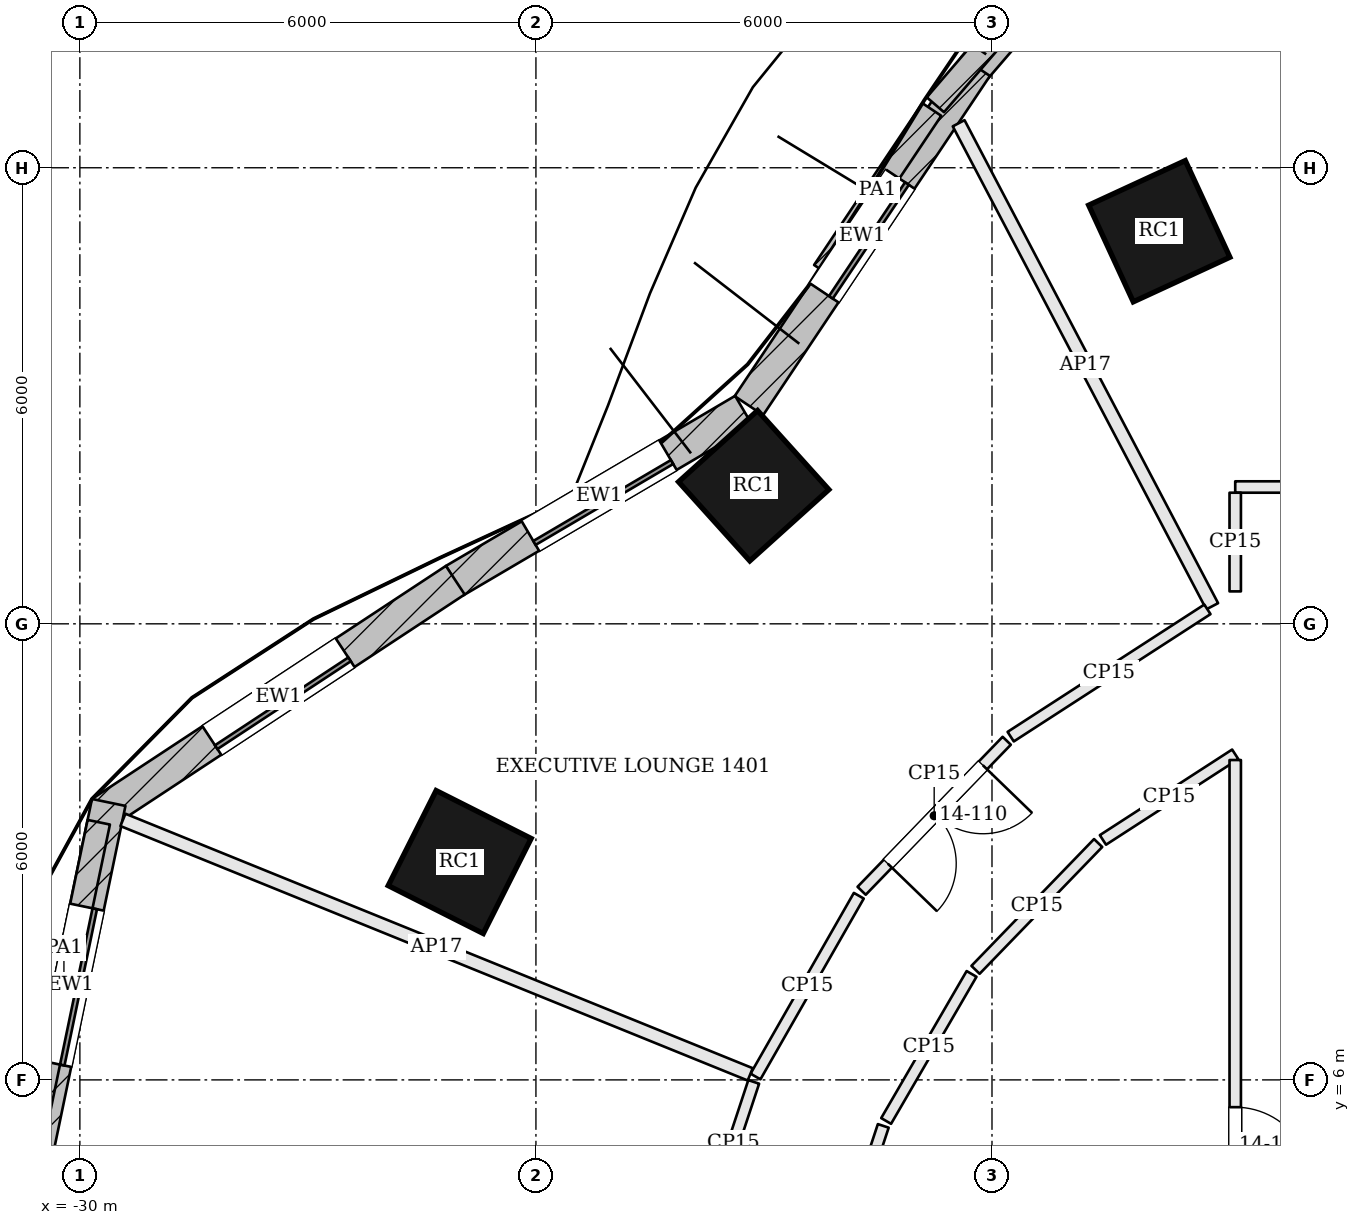
"""IFC4 building model, lengths in metres.
Left out: names, types, materials, properties, quantities, classifications, styles, units other than length and angle.
Written with IfcOpenShell. Run it as: python <this file> out.ifc"""

import sys

from ifc_helpers import new_model, si_unit, direction, frame, frame_2d, origin, origin_2d, place, context, subcontext, project, spatial, rectangle, extrude, element, fill, save


model = new_model("IFC4")
c1 = context("Model", 3, precision=1e-05, world=origin(), true_north=direction((0.0, 1.0)))
c2 = subcontext(c1, "Body", "Model", "MODEL_VIEW")
j1 = project(units=[si_unit("LENGTHUNIT", "METRE"), si_unit("PLANEANGLEUNIT", "RADIAN")], contexts=[c1])
p1 = place(None, origin())
s1 = spatial("IfcSite", under=j1, at=p1, CompositionType="ELEMENT")
p2 = place(p1, origin())
s2 = spatial("IfcBuilding", under=s1, at=p2, CompositionType="ELEMENT")
p3 = place(p2, frame((0.0, 0.0, 66.3)))
s3 = spatial("IfcBuildingStorey", under=s2, at=p3, CompositionType="ELEMENT", Elevation=66.3)
for number, where, z_axis, x_axis in (
    (1, (-15.799, 17.165, 0.0), (0.0, 0.0, 1.0), (-0.908, -0.419, 0.0)),
    (2, (-21.135, 13.817, 0.0), (0.0, 0.0, 1.0), (-0.743, -0.67, 0.0)),
    (3, (-25.003, 8.866, 0.0), (0.0, 0.0, 1.0), (-0.45, -0.893, 0.0)),
):
    element("IfcColumn", number, at=place(p3, frame(where, z_axis=z_axis, x_axis=x_axis)), inside=s3, PredefinedType="COLUMN", context=c2, shape_type="SweptSolid", body=[
        extrude(rectangle(XDim=1.4, YDim=1.4, at=origin_2d()), origin(), (0.0, 0.0, 1.0), 3.6),
    ])
p4 = place(p3, frame((-15.919, 21.999, 0.0), z_axis=(0.0, 0.0, 1.0), x_axis=(-0.652009971272, -0.758210391225, 0.0)))
e4 = element("IfcWall", 4, at=p4, inside=s3, PredefinedType="SOLIDWALL", context=c2, shape_type="SweptSolid", body=[
    extrude(rectangle(XDim=3.545, YDim=0.45, at=frame_2d((1.772, 0.0))), origin(), (0.0, 0.0, 1.0), 3.4),
])
p5 = place(p4, frame((0.722, 0.0, 0.9)))
e5 = element("IfcOpeningElement", 5, at=p5, cuts=e4, PredefinedType="OPENING", context=c2, shape_type="SweptSolid", body=[
    extrude(rectangle(XDim=2.1, YDim=2.0, at=frame_2d((1.05, 1.0))), frame((0.0, 0.235, 0.0), z_axis=(0.0, -1.0, 0.0), x_axis=(1.0, 0.0, 0.0)), (0.0, 0.0, 1.0), 0.47),
])
p6 = place(p3, frame((-18.214, 19.333, 0.0), z_axis=(0.0, 0.0, 1.0), x_axis=(-0.555833135316, -0.831293886471, 0.0)))
e6 = element("IfcWall", 6, at=p6, inside=s3, PredefinedType="SOLIDWALL", context=c2, shape_type="SweptSolid", body=[
    extrude(rectangle(XDim=5.368, YDim=0.45, at=frame_2d((2.684, 0.0))), origin(), (0.0, 0.0, 1.0), 3.4),
])
p7 = place(p6, frame((1.784, 0.0, 0.9)))
e7 = element("IfcOpeningElement", 7, at=p7, cuts=e6, PredefinedType="OPENING", context=c2, shape_type="SweptSolid", body=[
    extrude(rectangle(XDim=1.8, YDim=2.0, at=frame_2d((0.9, 1.0))), frame((0.0, 0.235, 0.0), z_axis=(0.0, -1.0, 0.0), x_axis=(1.0, 0.0, 0.0)), (0.0, 0.0, 1.0), 0.47),
])
p8 = place(p3, frame((-21.266, 14.805, 0.0), z_axis=(0.0, 0.0, 1.0), x_axis=(-0.861975457737, -0.506950007653, 0.0)))
e8 = element("IfcWall", 8, at=p8, inside=s3, PredefinedType="SOLIDWALL", context=c2, shape_type="SweptSolid", body=[
    extrude(rectangle(XDim=4.413, YDim=0.45, at=frame_2d((2.207, 0.0))), origin(), (0.0, 0.0, 1.0), 3.4),
])
p9 = place(p8, frame((1.156, 0.0, 0.9)))
e9 = element("IfcOpeningElement", 9, at=p9, cuts=e8, PredefinedType="OPENING", context=c2, shape_type="SweptSolid", body=[
    extrude(rectangle(XDim=2.1, YDim=2.0, at=frame_2d((1.05, 1.0))), frame((0.0, 0.235, 0.0), z_axis=(0.0, -1.0, 0.0), x_axis=(1.0, 0.0, 0.0)), (0.0, 0.0, 1.0), 0.47),
])
p10 = place(p3, frame((-25.061, 12.574, 0.0), z_axis=(0.0, 0.0, 1.0), x_axis=(-0.83520622102, -0.549936876714, 0.0)))
e10 = element("IfcWall", 10, at=p10, inside=s3, PredefinedType="SOLIDWALL", context=c2, shape_type="SweptSolid", body=[
    extrude(rectangle(XDim=5.57, YDim=0.45, at=frame_2d((2.785, 0.0))), origin(), (0.0, 0.0, 1.0), 3.4),
])
p11 = place(p10, frame((1.735, 0.0, 0.9)))
e11 = element("IfcOpeningElement", 11, at=p11, cuts=e10, PredefinedType="OPENING", context=c2, shape_type="SweptSolid", body=[
    extrude(rectangle(XDim=2.1, YDim=2.0, at=frame_2d((1.05, 1.0))), frame((0.0, 0.235, 0.0), z_axis=(0.0, -1.0, 0.0), x_axis=(1.0, 0.0, 0.0)), (0.0, 0.0, 1.0), 0.47),
])
p12 = place(p3, frame((-29.621, 9.65, 0.0), z_axis=(0.0, 0.0, 1.0), x_axis=(-0.203505836306, -0.979073732969, 0.0)))
e12 = element("IfcWall", 12, at=p12, inside=s3, PredefinedType="SOLIDWALL", context=c2, shape_type="SweptSolid", body=[
    extrude(rectangle(XDim=4.914, YDim=0.45, at=frame_2d((2.457, 0.0))), origin(), (0.0, 0.0, 1.0), 3.4),
])
p13 = place(p12, frame((1.407, 0.0, 0.9)))
e13 = element("IfcOpeningElement", 13, at=p13, cuts=e12, PredefinedType="OPENING", context=c2, shape_type="SweptSolid", body=[
    extrude(rectangle(XDim=2.1, YDim=2.0, at=frame_2d((1.05, 1.0))), frame((0.0, 0.235, 0.0), z_axis=(0.0, -1.0, 0.0), x_axis=(1.0, 0.0, 0.0)), (0.0, 0.0, 1.0), 0.47),
])
p14 = place(p3, frame((-18.076, 19.492, 0.0), z_axis=(0.0, 0.0, 1.0), x_axis=(-0.822618823872, 0.568593238274, 0.0)))
e14 = element("IfcWall", 14, at=p14, inside=s3, PredefinedType="SOLIDWALL", context=c2, shape_type="SweptSolid", body=[
    extrude(rectangle(XDim=1.75, YDim=0.2, at=frame_2d((0.875, 0.0))), origin(), (0.0, 0.0, 1.0), 3.4),
])
p15 = place(p3, frame((-16.056, 21.956, 3.6), z_axis=(0.0, 0.0, 1.0), x_axis=(-0.652038588201, -0.75818578165, 0.0)))
e15 = element("IfcWall", 15, at=p15, inside=s3, PredefinedType="PARAPET", context=c2, shape_type="SweptSolid", body=[
    extrude(rectangle(XDim=4.124, YDim=0.3, at=frame_2d((2.062, 0.0))), origin(), (0.0, 0.0, 1.0), 1.1),
])
p16 = place(p3, frame((-18.792, 18.767, 3.6), z_axis=(0.0, 0.0, 1.0), x_axis=(-0.555843382853, -0.831287034507, 0.0)))
e16 = element("IfcWall", 16, at=p16, inside=s3, PredefinedType="PARAPET", context=c2, shape_type="SweptSolid", body=[
    extrude(rectangle(XDim=2.562, YDim=0.3, at=frame_2d((1.281, 0.0))), origin(), (0.0, 0.0, 1.0), 1.1),
])
p17 = place(p3, frame((-29.751, 9.39, 3.6), z_axis=(0.0, 0.0, 1.0), x_axis=(-0.203510555438, -0.97907275206, 0.0)))
e17 = element("IfcWall", 17, at=p17, inside=s3, PredefinedType="PARAPET", context=c2, shape_type="SweptSolid", body=[
    extrude(rectangle(XDim=4.505, YDim=0.3, at=frame_2d((2.252, 0.0))), origin(), (0.0, 0.0, 1.0), 1.1),
])
p18 = place(p3, frame((-11.464, 13.8, 0.0), z_axis=(0.0, 0.0, 1.0), x_axis=(-1.0, 0.0, 0.0)))
e18 = element("IfcWall", 18, at=p18, inside=s3, PredefinedType="PARTITIONING", context=c2, shape_type="SweptSolid", body=[
    extrude(rectangle(XDim=3.336, YDim=0.15, at=frame_2d((1.668, 0.0))), origin(), (0.0, 0.0, 1.0), 2.68),
])
p19 = place(p3, frame((-14.8, 13.725, 0.0), z_axis=(0.0, 0.0, 1.0), x_axis=(-0.000188040613, -0.99999998232, 0.0)))
e19 = element("IfcWall", 19, at=p19, inside=s3, PredefinedType="PARTITIONING", context=c2, shape_type="SweptSolid", body=[
    extrude(rectangle(XDim=1.298, YDim=0.15, at=frame_2d((0.649, 0.0))), origin(), (0.0, 0.0, 1.0), 2.68),
])
p20 = place(p3, frame((-18.439, 18.586, 0.0), z_axis=(0.0, 0.0, 1.0), x_axis=(0.464815231758, -0.885407702884, 0.0)))
e20 = element("IfcWall", 20, at=p20, inside=s3, PredefinedType="PARTITIONING", context=c2, shape_type="SweptSolid", body=[
    extrude(rectangle(XDim=7.177, YDim=0.175, at=frame_2d((3.588, 0.0))), origin(), (0.0, 0.0, 1.0), 2.68),
])
p21 = place(p3, frame((-15.166, 12.19, 0.0), z_axis=(0.0, 0.0, 1.0), x_axis=(-0.839538287855, -0.54330052754, 0.0)))
e21 = element("IfcWall", 21, at=p21, inside=s3, PredefinedType="PARTITIONING", context=c2, shape_type="SweptSolid", body=[
    extrude(rectangle(XDim=3.083, YDim=0.15, at=frame_2d((1.542, 0.0))), origin(), (0.0, 0.0, 1.0), 2.68),
])
p22 = place(p3, frame((-17.806, 10.462, 0.0), z_axis=(0.0, 0.0, 1.0), x_axis=(-0.695227375123, -0.71878988368, 0.0)))
e22 = element("IfcWall", 22, at=p22, inside=s3, PredefinedType="PARTITIONING", context=c2, shape_type="SweptSolid", body=[
    extrude(rectangle(XDim=2.746, YDim=0.15, at=frame_2d((1.373, 0.0))), origin(), (0.0, 0.0, 1.0), 2.68),
])
p23 = place(p22, frame((0.45, 0.0, 0.0)))
e23 = element("IfcOpeningElement", 23, at=p23, cuts=e22, PredefinedType="OPENING", context=c2, shape_type="SweptSolid", body=[
    extrude(rectangle(XDim=1.8, YDim=2.1, at=frame_2d((0.9, 1.05))), frame((0.0, 0.085, 0.0), z_axis=(0.0, -1.0, 0.0), x_axis=(1.0, 0.0, 0.0)), (0.0, 0.0, 1.0), 0.17),
])
p24 = place(p3, frame((-19.752, 8.423, 0.0), z_axis=(0.0, 0.0, 1.0), x_axis=(-0.496186930697, -0.86821571617, 0.0)))
e24 = element("IfcWall", 24, at=p24, inside=s3, PredefinedType="PARTITIONING", context=c2, shape_type="SweptSolid", body=[
    extrude(rectangle(XDim=2.739, YDim=0.15, at=frame_2d((1.37, 0.0))), origin(), (0.0, 0.0, 1.0), 2.68),
])
p25 = place(p3, frame((-29.434, 9.421, 0.0), z_axis=(0.0, 0.0, 1.0), x_axis=(0.92666211568, -0.375895362252, 0.0)))
e25 = element("IfcWall", 25, at=p25, inside=s3, PredefinedType="PARTITIONING", context=c2, shape_type="SweptSolid", body=[
    extrude(rectangle(XDim=8.906, YDim=0.175, at=frame_2d((4.453, 0.0))), origin(), (0.0, 0.0, 1.0), 2.68),
])
p26 = place(p3, frame((-21.135, 5.973, 0.0), z_axis=(0.0, 0.0, 1.0), x_axis=(-0.313641633586, -0.949541429155, 0.0)))
e26 = element("IfcWall", 26, at=p26, inside=s3, PredefinedType="PARTITIONING", context=c2, shape_type="SweptSolid", body=[
    extrude(rectangle(XDim=1.7, YDim=0.15, at=frame_2d((0.85, 0.0))), origin(), (0.0, 0.0, 1.0), 2.68),
])
p27 = place(p3, frame((-19.882, 4.028, 0.0), z_axis=(0.0, 0.0, 1.0), x_axis=(0.313632756375, 0.949544361327, 0.0)))
e27 = element("IfcWall", 27, at=p27, inside=s3, PredefinedType="PARTITIONING", context=c2, shape_type="SweptSolid", body=[
    extrude(rectangle(XDim=1.44, YDim=0.15, at=frame_2d((0.72, 0.0))), origin(), (0.0, 0.0, 1.0), 2.68),
])
p28 = place(p3, frame((-19.393, 5.46, 0.0), z_axis=(0.0, 0.0, 1.0), x_axis=(0.502296094562, 0.864695688314, 0.0)))
e28 = element("IfcWall", 28, at=p28, inside=s3, PredefinedType="PARTITIONING", context=c2, shape_type="SweptSolid", body=[
    extrude(rectangle(XDim=2.237, YDim=0.15, at=frame_2d((1.119, 0.0))), origin(), (0.0, 0.0, 1.0), 2.68),
])
p29 = place(p3, frame((-18.217, 7.448, 0.0), z_axis=(0.0, 0.0, 1.0), x_axis=(0.695172542355, 0.718842914938, 0.0)))
e29 = element("IfcWall", 29, at=p29, inside=s3, PredefinedType="PARTITIONING", context=c2, shape_type="SweptSolid", body=[
    extrude(rectangle(XDim=2.321, YDim=0.15, at=frame_2d((1.16, 0.0))), origin(), (0.0, 0.0, 1.0), 2.68),
])
p30 = place(p3, frame((-16.54, 9.157, 0.0), z_axis=(0.0, 0.0, 1.0), x_axis=(0.839529075717, 0.543314762385, 0.0)))
e30 = element("IfcWall", 30, at=p30, inside=s3, PredefinedType="PARTITIONING", context=c2, shape_type="SweptSolid", body=[
    extrude(rectangle(XDim=2.073, YDim=0.15, at=frame_2d((1.036, 0.0))), origin(), (0.0, 0.0, 1.0), 2.68),
])
p31 = place(p3, frame((-14.8, 10.208, 0.0), z_axis=(0.0, 0.0, 1.0), x_axis=(0.0, -1.0, 0.0)))
e31 = element("IfcWall", 31, at=p31, inside=s3, PredefinedType="PARTITIONING", context=c2, shape_type="SweptSolid", body=[
    extrude(rectangle(XDim=15.008, YDim=0.15, at=frame_2d((7.504, 0.0))), origin(), (0.0, 0.0, 1.0), 2.68),
])
p32 = place(p31, frame((4.567, 0.0, 0.0)))
e32 = element("IfcOpeningElement", 32, at=p32, cuts=e31, PredefinedType="OPENING", context=c2, shape_type="SweptSolid", body=[
    extrude(rectangle(XDim=1.0, YDim=2.1, at=frame_2d((0.5, 1.05))), frame((0.0, 0.085, 0.0), z_axis=(0.0, -1.0, 0.0), x_axis=(1.0, 0.0, 0.0)), (0.0, 0.0, 1.0), 0.17),
])
p33 = place(p7, origin())
e33 = element("IfcWindow", 33, at=p33, inside=s3, PartitioningType="SINGLE_PANEL", PredefinedType="WINDOW", context=c2, shape_type="SweptSolid", body=[
    extrude(rectangle(XDim=1.8, YDim=2.0, at=frame_2d((0.9, 1.0))), frame((0.0, 0.135, 0.0), z_axis=(0.0, -1.0, 0.0), x_axis=(1.0, 0.0, 0.0)), (0.0, 0.0, 1.0), 0.06),
])
fill(e7, e33)
p34 = place(p9, origin())
e34 = element("IfcWindow", 34, at=p34, inside=s3, PartitioningType="SINGLE_PANEL", PredefinedType="WINDOW", context=c2, shape_type="SweptSolid", body=[
    extrude(rectangle(XDim=2.1, YDim=2.0, at=frame_2d((1.05, 1.0))), frame((0.0, 0.135, 0.0), z_axis=(0.0, -1.0, 0.0), x_axis=(1.0, 0.0, 0.0)), (0.0, 0.0, 1.0), 0.06),
])
fill(e9, e34)
p35 = place(p11, origin())
e35 = element("IfcWindow", 35, at=p35, inside=s3, PartitioningType="SINGLE_PANEL", PredefinedType="WINDOW", context=c2, shape_type="SweptSolid", body=[
    extrude(rectangle(XDim=2.1, YDim=2.0, at=frame_2d((1.05, 1.0))), frame((0.0, 0.135, 0.0), z_axis=(0.0, -1.0, 0.0), x_axis=(1.0, 0.0, 0.0)), (0.0, 0.0, 1.0), 0.06),
])
fill(e11, e35)
p36 = place(p13, origin())
e36 = element("IfcWindow", 36, at=p36, inside=s3, PartitioningType="SINGLE_PANEL", PredefinedType="WINDOW", context=c2, shape_type="SweptSolid", body=[
    extrude(rectangle(XDim=2.1, YDim=2.0, at=frame_2d((1.05, 1.0))), frame((0.0, 0.135, 0.0), z_axis=(0.0, -1.0, 0.0), x_axis=(1.0, 0.0, 0.0)), (0.0, 0.0, 1.0), 0.06),
])
fill(e13, e36)
p37 = place(p23, origin())
e37 = element("IfcDoor", 37, at=p37, inside=s3, OperationType="DOUBLE_DOOR_SINGLE_SWING", PredefinedType="DOOR", context=c2, shape_type="SweptSolid", body=[
    extrude(rectangle(XDim=1.8, YDim=2.1, at=frame_2d((0.9, 1.05))), frame((0.0, 0.025, 0.0), z_axis=(0.0, -1.0, 0.0), x_axis=(1.0, 0.0, 0.0)), (0.0, 0.0, 1.0), 0.05),
])
fill(e23, e37)
p38 = place(p32, origin())
e38 = element("IfcDoor", 38, at=p38, inside=s3, OperationType="SINGLE_SWING_RIGHT", PredefinedType="DOOR", context=c2, shape_type="SweptSolid", body=[
    extrude(rectangle(XDim=1.0, YDim=2.1, at=frame_2d((0.5, 1.05))), frame((0.0, 0.025, 0.0), z_axis=(0.0, -1.0, 0.0), x_axis=(1.0, 0.0, 0.0)), (0.0, 0.0, 1.0), 0.05),
])
fill(e32, e38)
save(model, sys.argv[1])
